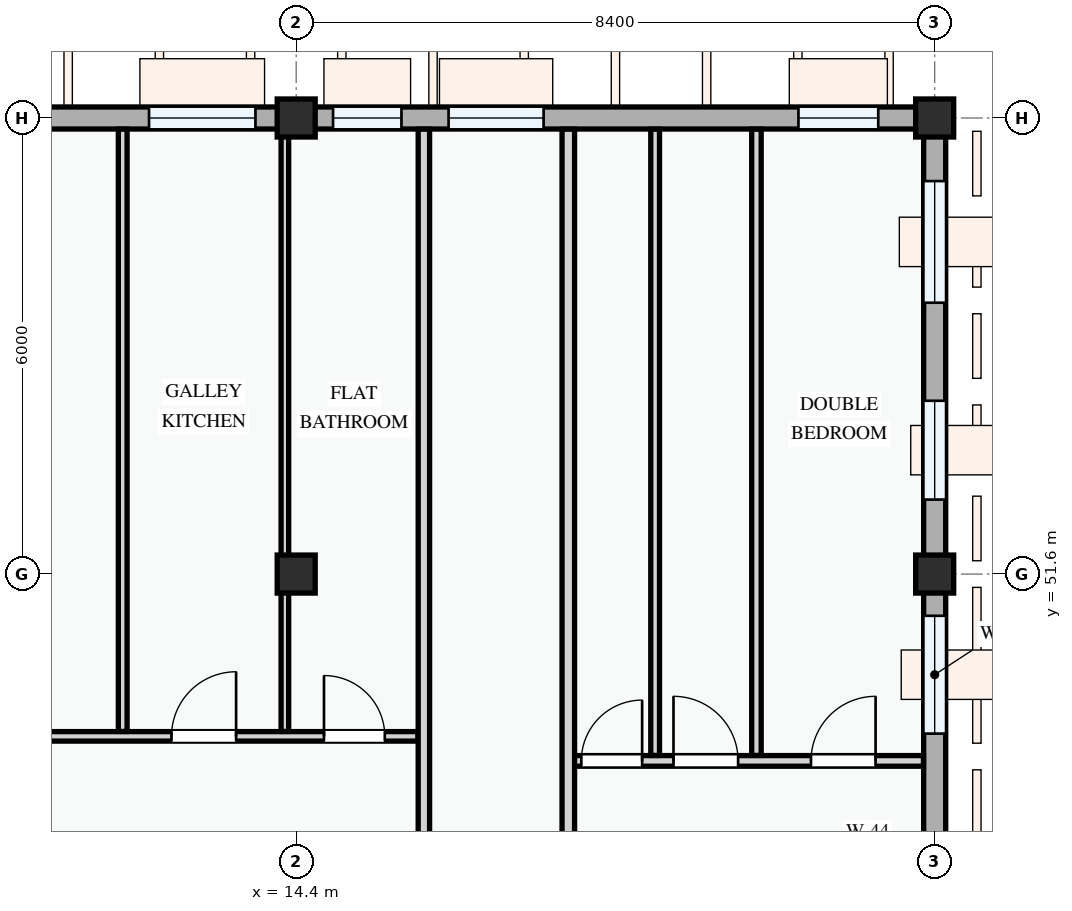
"""IFC4 building model, lengths in metres.
Left out: names, types, materials, properties, quantities, classifications, styles, units other than length and angle.
Written with IfcOpenShell. Run it as: python <this file> out.ifc"""

import sys

from ifc_helpers import new_model, si_unit, direction, frame, frame_2d, origin, origin_2d, place, context, subcontext, project, spatial, rectangle, extrude, element, fill, save


model = new_model("IFC4")
c1 = context("Model", 3, precision=1e-05, world=origin(), true_north=direction((0.0, 1.0)))
c2 = subcontext(c1, "Body", "Model", "MODEL_VIEW")
j1 = project(units=[si_unit("LENGTHUNIT", "METRE"), si_unit("PLANEANGLEUNIT", "RADIAN")], contexts=[c1])
p1 = place(None, origin())
s1 = spatial("IfcSite", under=j1, at=p1, CompositionType="ELEMENT")
p2 = place(p1, origin())
s2 = spatial("IfcBuilding", under=s1, at=p2, CompositionType="ELEMENT")
p3 = place(p2, frame((0.0, 0.0, 21.3)))
s3 = spatial("IfcBuildingStorey", under=s2, at=p3, CompositionType="ELEMENT", Elevation=21.3)
for number, where, z_axis, x_axis in (
    (1, (14.4, 51.6, 0.0), (0.0, 0.0, 1.0), (1.0, 0.0, 0.0)),
    (2, (14.4, 57.6, 0.0), (0.0, 0.0, 1.0), (1.0, 0.0, 0.0)),
    (3, (22.8, 51.6, 0.0), (0.0, 0.0, 1.0), (1.0, 0.0, 0.0)),
    (4, (22.8, 57.6, 0.0), (0.0, 0.0, 1.0), (1.0, 0.0, 0.0)),
):
    element("IfcColumn", number, at=place(p3, frame(where, z_axis=z_axis, x_axis=x_axis)), inside=s3, PredefinedType="COLUMN", context=c2, shape_type="SweptSolid", body=[
        extrude(rectangle(XDim=0.5, YDim=0.5, at=origin_2d()), origin(), (0.0, 0.0, 1.0), 3.3),
    ])
p4 = place(p3, frame((22.8, 43.2, 0.0), z_axis=(0.0, 0.0, 1.0), x_axis=(0.0, 1.0, 0.0)))
e5 = element("IfcWall", 5, at=p4, inside=s3, PredefinedType="STANDARD", context=c2, shape_type="SweptSolid", body=[
    extrude(rectangle(XDim=8.4, YDim=0.29, at=frame_2d((4.2, 0.0))), origin(), (0.0, 0.0, 1.0), 2.425),
])
p5 = place(p4, frame((0.888, 0.0, 0.78)))
e6 = element("IfcOpeningElement", 6, at=p5, cuts=e5, PredefinedType="OPENING", context=c2, shape_type="SweptSolid", body=[
    extrude(rectangle(XDim=1.55, YDim=1.4, at=frame_2d((0.775, 0.7))), frame((0.0, 0.155, 0.0), z_axis=(0.0, -1.0, 0.0), x_axis=(1.0, 0.0, 0.0)), (0.0, 0.0, 1.0), 0.31),
])
p6 = place(p4, frame((3.944, 0.0, 0.78)))
e7 = element("IfcOpeningElement", 7, at=p6, cuts=e5, PredefinedType="OPENING", context=c2, shape_type="SweptSolid", body=[
    extrude(rectangle(XDim=1.05, YDim=1.2, at=frame_2d((0.525, 0.6))), frame((0.0, 0.155, 0.0), z_axis=(0.0, -1.0, 0.0), x_axis=(1.0, 0.0, 0.0)), (0.0, 0.0, 1.0), 0.31),
])
p7 = place(p4, frame((6.301, 0.0, 0.78)))
e8 = element("IfcOpeningElement", 8, at=p7, cuts=e5, PredefinedType="OPENING", context=c2, shape_type="SweptSolid", body=[
    extrude(rectangle(XDim=1.55, YDim=1.4, at=frame_2d((0.775, 0.7))), frame((0.0, 0.155, 0.0), z_axis=(0.0, -1.0, 0.0), x_axis=(1.0, 0.0, 0.0)), (0.0, 0.0, 1.0), 0.31),
])
p8 = place(p3, frame((22.8, 51.6, 0.0), z_axis=(0.0, 0.0, 1.0), x_axis=(0.0, 1.0, 0.0)))
e9 = element("IfcWall", 9, at=p8, inside=s3, PredefinedType="STANDARD", context=c2, shape_type="SweptSolid", body=[
    extrude(rectangle(XDim=6.0, YDim=0.29, at=frame_2d((3.0, 0.0))), origin(), (0.0, 0.0, 1.0), 2.575),
])
p9 = place(p8, frame((0.98, 0.0, 0.78)))
e10 = element("IfcOpeningElement", 10, at=p9, cuts=e9, PredefinedType="OPENING", context=c2, shape_type="SweptSolid", body=[
    extrude(rectangle(XDim=1.3, YDim=1.4, at=frame_2d((0.65, 0.7))), frame((0.0, 0.155, 0.0), z_axis=(0.0, -1.0, 0.0), x_axis=(1.0, 0.0, 0.0)), (0.0, 0.0, 1.0), 0.31),
])
p10 = place(p8, frame((3.57, 0.0, 0.78)))
e11 = element("IfcOpeningElement", 11, at=p10, cuts=e9, PredefinedType="OPENING", context=c2, shape_type="SweptSolid", body=[
    extrude(rectangle(XDim=1.6, YDim=1.55, at=frame_2d((0.8, 0.775))), frame((0.0, 0.155, 0.0), z_axis=(0.0, -1.0, 0.0), x_axis=(1.0, 0.0, 0.0)), (0.0, 0.0, 1.0), 0.31),
])
p11 = place(p3, frame((22.8, 57.6, 0.0), z_axis=(0.0, 0.0, 1.0), x_axis=(-1.0, 0.0, 0.0)))
e12 = element("IfcWall", 12, at=p11, inside=s3, PredefinedType="STANDARD", context=c2, shape_type="SweptSolid", body=[
    extrude(rectangle(XDim=8.4, YDim=0.29, at=frame_2d((4.2, 0.0))), origin(), (0.0, 0.0, 1.0), 2.375),
])
p12 = place(p11, frame((0.742, 0.0, 0.78)))
e13 = element("IfcOpeningElement", 13, at=p12, cuts=e12, PredefinedType="OPENING", context=c2, shape_type="SweptSolid", body=[
    extrude(rectangle(XDim=1.05, YDim=1.2, at=frame_2d((0.525, 0.6))), frame((0.0, 0.155, 0.0), z_axis=(0.0, -1.0, 0.0), x_axis=(1.0, 0.0, 0.0)), (0.0, 0.0, 1.0), 0.31),
])
p13 = place(p11, frame((5.145, 0.0, 0.78)))
e14 = element("IfcOpeningElement", 14, at=p13, cuts=e12, PredefinedType="OPENING", context=c2, shape_type="SweptSolid", body=[
    extrude(rectangle(XDim=1.25, YDim=1.45, at=frame_2d((0.625, 0.725))), frame((0.0, 0.155, 0.0), z_axis=(0.0, -1.0, 0.0), x_axis=(1.0, 0.0, 0.0)), (0.0, 0.0, 1.0), 0.31),
])
p14 = place(p11, frame((7.015, 0.0, 0.78)))
e15 = element("IfcOpeningElement", 15, at=p14, cuts=e12, PredefinedType="OPENING", context=c2, shape_type="SweptSolid", body=[
    extrude(rectangle(XDim=0.9, YDim=1.2, at=frame_2d((0.45, 0.6))), frame((0.0, 0.155, 0.0), z_axis=(0.0, -1.0, 0.0), x_axis=(1.0, 0.0, 0.0)), (0.0, 0.0, 1.0), 0.31),
])
p15 = place(p3, frame((14.4, 57.6, 0.0), z_axis=(0.0, 0.0, 1.0), x_axis=(-1.0, 0.0, 0.0)))
e16 = element("IfcWall", 16, at=p15, inside=s3, PredefinedType="STANDARD", context=c2, shape_type="SweptSolid", body=[
    extrude(rectangle(XDim=6.0, YDim=0.29, at=frame_2d((3.0, 0.0))), origin(), (0.0, 0.0, 1.0), 2.475),
])
p16 = place(p15, frame((0.536, 0.0, 0.78)))
e17 = element("IfcOpeningElement", 17, at=p16, cuts=e16, PredefinedType="OPENING", context=c2, shape_type="SweptSolid", body=[
    extrude(rectangle(XDim=1.4, YDim=1.45, at=frame_2d((0.7, 0.725))), frame((0.0, 0.155, 0.0), z_axis=(0.0, -1.0, 0.0), x_axis=(1.0, 0.0, 0.0)), (0.0, 0.0, 1.0), 0.31),
])
p17 = place(p15, frame((3.596, 0.0, 0.78)))
e18 = element("IfcOpeningElement", 18, at=p17, cuts=e16, PredefinedType="OPENING", context=c2, shape_type="SweptSolid", body=[
    extrude(rectangle(XDim=0.9, YDim=1.2, at=frame_2d((0.45, 0.6))), frame((0.0, 0.155, 0.0), z_axis=(0.0, -1.0, 0.0), x_axis=(1.0, 0.0, 0.0)), (0.0, 0.0, 1.0), 0.31),
])
p18 = place(p3, frame((8.547, 49.465, 0.0), z_axis=(0.0, 0.0, 1.0), x_axis=(1.0, 0.0, 0.0)))
e19 = element("IfcWall", 19, at=p18, inside=s3, PredefinedType="PARTITIONING", context=c2, shape_type="SweptSolid", body=[
    extrude(rectangle(XDim=7.456, YDim=0.125, at=frame_2d((3.728, 0.0))), origin(), (0.0, 0.0, 1.0), 3.0),
])
p19 = place(p18, frame((1.317, 0.0, 0.0)))
e20 = element("IfcOpeningElement", 20, at=p19, cuts=e19, PredefinedType="OPENING", context=c2, shape_type="SweptSolid", body=[
    extrude(rectangle(XDim=0.85, YDim=2.1, at=frame_2d((0.425, 1.05))), frame((0.0, 0.073, 0.0), z_axis=(0.0, -1.0, 0.0), x_axis=(1.0, 0.0, 0.0)), (0.0, 0.0, 1.0), 0.145),
])
p20 = place(p18, frame((4.212, 0.0, 0.0)))
e21 = element("IfcOpeningElement", 21, at=p20, cuts=e19, PredefinedType="OPENING", context=c2, shape_type="SweptSolid", body=[
    extrude(rectangle(XDim=0.85, YDim=2.1, at=frame_2d((0.425, 1.05))), frame((0.0, 0.073, 0.0), z_axis=(0.0, -1.0, 0.0), x_axis=(1.0, 0.0, 0.0)), (0.0, 0.0, 1.0), 0.145),
])
p21 = place(p18, frame((6.219, 0.0, 0.0)))
e22 = element("IfcOpeningElement", 22, at=p21, cuts=e19, PredefinedType="OPENING", context=c2, shape_type="SweptSolid", body=[
    extrude(rectangle(XDim=0.8, YDim=2.1, at=frame_2d((0.4, 1.05))), frame((0.0, 0.073, 0.0), z_axis=(0.0, -1.0, 0.0), x_axis=(1.0, 0.0, 0.0)), (0.0, 0.0, 1.0), 0.145),
])
p22 = place(p3, frame((12.118, 49.53, 0.0), z_axis=(0.0, 0.0, 1.0), x_axis=(0.0, 1.0, 0.0)))
e23 = element("IfcWall", 23, at=p22, inside=s3, PredefinedType="PARTITIONING", context=c2, shape_type="SweptSolid", body=[
    extrude(rectangle(XDim=7.923, YDim=0.115, at=frame_2d((3.962, 0.0))), origin(), (0.0, 0.0, 1.0), 3.0),
])
p23 = place(p3, frame((14.251, 49.53, 0.0), z_axis=(0.0, 0.0, 1.0), x_axis=(0.0, 1.0, 0.0)))
e24 = element("IfcWall", 24, at=p23, inside=s3, PredefinedType="PARTITIONING", context=c2, shape_type="SweptSolid", body=[
    extrude(rectangle(XDim=7.923, YDim=0.1, at=frame_2d((3.962, 0.0))), origin(), (0.0, 0.0, 1.0), 2.425),
])
p24 = place(p3, frame((17.98, 49.142, 0.0), z_axis=(0.0, 0.0, 1.0), x_axis=(1.0, 0.0, 0.0)))
e25 = element("IfcWall", 25, at=p24, inside=s3, PredefinedType="PARTITIONING", context=c2, shape_type="SweptSolid", body=[
    extrude(rectangle(XDim=4.673, YDim=0.14, at=frame_2d((2.336, 0.0))), origin(), (0.0, 0.0, 1.0), 3.0),
])
p25 = place(p24, frame((0.171, 0.0, 0.0)))
e26 = element("IfcOpeningElement", 26, at=p25, cuts=e25, PredefinedType="OPENING", context=c2, shape_type="SweptSolid", body=[
    extrude(rectangle(XDim=0.8, YDim=2.1, at=frame_2d((0.4, 1.05))), frame((0.0, 0.08, 0.0), z_axis=(0.0, -1.0, 0.0), x_axis=(1.0, 0.0, 0.0)), (0.0, 0.0, 1.0), 0.16),
])
p26 = place(p24, frame((1.384, 0.0, 0.0)))
e27 = element("IfcOpeningElement", 27, at=p26, cuts=e25, PredefinedType="OPENING", context=c2, shape_type="SweptSolid", body=[
    extrude(rectangle(XDim=0.85, YDim=2.1, at=frame_2d((0.425, 1.05))), frame((0.0, 0.08, 0.0), z_axis=(0.0, -1.0, 0.0), x_axis=(1.0, 0.0, 0.0)), (0.0, 0.0, 1.0), 0.16),
])
p27 = place(p24, frame((3.193, 0.0, 0.0)))
e28 = element("IfcOpeningElement", 28, at=p27, cuts=e25, PredefinedType="OPENING", context=c2, shape_type="SweptSolid", body=[
    extrude(rectangle(XDim=0.85, YDim=2.1, at=frame_2d((0.425, 1.05))), frame((0.0, 0.08, 0.0), z_axis=(0.0, -1.0, 0.0), x_axis=(1.0, 0.0, 0.0)), (0.0, 0.0, 1.0), 0.16),
])
p28 = place(p3, frame((20.455, 49.214, 0.0), z_axis=(0.0, 0.0, 1.0), x_axis=(0.0, 1.0, 0.0)))
e29 = element("IfcWall", 29, at=p28, inside=s3, PredefinedType="PARTITIONING", context=c2, shape_type="SweptSolid", body=[
    extrude(rectangle(XDim=8.239, YDim=0.125, at=frame_2d((4.119, 0.0))), origin(), (0.0, 0.0, 1.0), 3.0),
])
p29 = place(p3, frame((19.122, 49.214, 0.0), z_axis=(0.0, 0.0, 1.0), x_axis=(0.0, 1.0, 0.0)))
e30 = element("IfcWall", 30, at=p29, inside=s3, PredefinedType="PARTITIONING", context=c2, shape_type="SweptSolid", body=[
    extrude(rectangle(XDim=8.239, YDim=0.115, at=frame_2d((4.119, 0.0))), origin(), (0.0, 0.0, 1.0), 3.0),
])
p30 = place(p3, frame((16.08, 22.66, 0.0), z_axis=(0.0, 0.0, 1.0), x_axis=(0.0, 1.0, 0.0)))
e31 = element("IfcWall", 31, at=p30, inside=s3, PredefinedType="PARTITIONING", context=c2, shape_type="SweptSolid", body=[
    extrude(rectangle(XDim=34.793, YDim=0.15, at=frame_2d((17.396, 0.0))), origin(), (0.0, 0.0, 1.0), 3.0),
])
p31 = place(p30, frame((2.627, 0.0, 0.0)))
e32 = element("IfcOpeningElement", 32, at=p31, cuts=e31, PredefinedType="OPENING", context=c2, shape_type="SweptSolid", body=[
    extrude(rectangle(XDim=0.92, YDim=2.1, at=frame_2d((0.46, 1.05))), frame((0.0, 0.085, 0.0), z_axis=(0.0, -1.0, 0.0), x_axis=(1.0, 0.0, 0.0)), (0.0, 0.0, 1.0), 0.17),
])
p32 = place(p30, frame((10.02, 0.0, 0.0)))
e33 = element("IfcOpeningElement", 33, at=p32, cuts=e31, PredefinedType="OPENING", context=c2, shape_type="SweptSolid", body=[
    extrude(rectangle(XDim=0.92, YDim=2.1, at=frame_2d((0.46, 1.05))), frame((0.0, 0.085, 0.0), z_axis=(0.0, -1.0, 0.0), x_axis=(1.0, 0.0, 0.0)), (0.0, 0.0, 1.0), 0.17),
])
p33 = place(p30, frame((24.355, 0.0, 0.0)))
e34 = element("IfcOpeningElement", 34, at=p33, cuts=e31, PredefinedType="OPENING", context=c2, shape_type="SweptSolid", body=[
    extrude(rectangle(XDim=0.92, YDim=2.1, at=frame_2d((0.46, 1.05))), frame((0.0, 0.085, 0.0), z_axis=(0.0, -1.0, 0.0), x_axis=(1.0, 0.0, 0.0)), (0.0, 0.0, 1.0), 0.17),
])
p34 = place(p3, frame((17.98, 22.66, 0.0), z_axis=(0.0, 0.0, 1.0), x_axis=(0.0, 1.0, 0.0)))
e35 = element("IfcWall", 35, at=p34, inside=s3, PredefinedType="PARTITIONING", context=c2, shape_type="SweptSolid", body=[
    extrude(rectangle(XDim=34.793, YDim=0.165, at=frame_2d((17.396, 0.0))), origin(), (0.0, 0.0, 1.0), 3.0),
])
p35 = place(p34, frame((2.63, 0.0, 0.0)))
e36 = element("IfcOpeningElement", 36, at=p35, cuts=e35, PredefinedType="OPENING", context=c2, shape_type="SweptSolid", body=[
    extrude(rectangle(XDim=0.96, YDim=2.12, at=frame_2d((0.48, 1.06))), frame((0.0, 0.093, 0.0), z_axis=(0.0, -1.0, 0.0), x_axis=(1.0, 0.0, 0.0)), (0.0, 0.0, 1.0), 0.185),
])
p36 = place(p34, frame((10.02, 0.0, 0.0)))
e37 = element("IfcOpeningElement", 37, at=p36, cuts=e35, PredefinedType="OPENING", context=c2, shape_type="SweptSolid", body=[
    extrude(rectangle(XDim=0.92, YDim=2.1, at=frame_2d((0.46, 1.05))), frame((0.0, 0.093, 0.0), z_axis=(0.0, -1.0, 0.0), x_axis=(1.0, 0.0, 0.0)), (0.0, 0.0, 1.0), 0.185),
])
p37 = place(p34, frame((24.289, 0.0, 0.0)))
e38 = element("IfcOpeningElement", 38, at=p37, cuts=e35, PredefinedType="OPENING", context=c2, shape_type="SweptSolid", body=[
    extrude(rectangle(XDim=0.92, YDim=2.1, at=frame_2d((0.46, 1.05))), frame((0.0, 0.093, 0.0), z_axis=(0.0, -1.0, 0.0), x_axis=(1.0, 0.0, 0.0)), (0.0, 0.0, 1.0), 0.185),
])
p38 = place(p7, origin())
e39 = element("IfcWindow", 39, at=p38, inside=s3, PartitioningType="SINGLE_PANEL", PredefinedType="WINDOW", context=c2, shape_type="SweptSolid", body=[
    extrude(rectangle(XDim=1.55, YDim=1.4, at=frame_2d((0.775, 0.7))), frame((0.0, 0.03, 0.0), z_axis=(0.0, -1.0, 0.0), x_axis=(1.0, 0.0, 0.0)), (0.0, 0.0, 1.0), 0.06),
])
fill(e8, e39)
p39 = place(p9, origin())
e40 = element("IfcWindow", 40, at=p39, inside=s3, PartitioningType="SINGLE_PANEL", PredefinedType="WINDOW", context=c2, shape_type="SweptSolid", body=[
    extrude(rectangle(XDim=1.3, YDim=1.4, at=frame_2d((0.65, 0.7))), frame((0.0, 0.03, 0.0), z_axis=(0.0, -1.0, 0.0), x_axis=(1.0, 0.0, 0.0)), (0.0, 0.0, 1.0), 0.06),
])
fill(e10, e40)
p40 = place(p10, origin())
e41 = element("IfcWindow", 41, at=p40, inside=s3, PartitioningType="DOUBLE_PANEL_VERTICAL", PredefinedType="WINDOW", context=c2, shape_type="SweptSolid", body=[
    extrude(rectangle(XDim=1.6, YDim=1.55, at=frame_2d((0.8, 0.775))), frame((0.0, 0.03, 0.0), z_axis=(0.0, -1.0, 0.0), x_axis=(1.0, 0.0, 0.0)), (0.0, 0.0, 1.0), 0.06),
])
fill(e11, e41)
p41 = place(p12, origin())
e42 = element("IfcWindow", 42, at=p41, inside=s3, PartitioningType="SINGLE_PANEL", PredefinedType="WINDOW", context=c2, shape_type="SweptSolid", body=[
    extrude(rectangle(XDim=1.05, YDim=1.2, at=frame_2d((0.525, 0.6))), frame((0.0, 0.03, 0.0), z_axis=(0.0, -1.0, 0.0), x_axis=(1.0, 0.0, 0.0)), (0.0, 0.0, 1.0), 0.06),
])
fill(e13, e42)
p42 = place(p13, origin())
e43 = element("IfcWindow", 43, at=p42, inside=s3, PartitioningType="SINGLE_PANEL", PredefinedType="WINDOW", context=c2, shape_type="SweptSolid", body=[
    extrude(rectangle(XDim=1.25, YDim=1.45, at=frame_2d((0.625, 0.725))), frame((0.0, 0.03, 0.0), z_axis=(0.0, -1.0, 0.0), x_axis=(1.0, 0.0, 0.0)), (0.0, 0.0, 1.0), 0.06),
])
fill(e14, e43)
p43 = place(p14, origin())
e44 = element("IfcWindow", 44, at=p43, inside=s3, PartitioningType="SINGLE_PANEL", PredefinedType="WINDOW", context=c2, shape_type="SweptSolid", body=[
    extrude(rectangle(XDim=0.9, YDim=1.2, at=frame_2d((0.45, 0.6))), frame((0.0, 0.03, 0.0), z_axis=(0.0, -1.0, 0.0), x_axis=(1.0, 0.0, 0.0)), (0.0, 0.0, 1.0), 0.06),
])
fill(e15, e44)
p44 = place(p16, origin())
e45 = element("IfcWindow", 45, at=p44, inside=s3, PartitioningType="SINGLE_PANEL", PredefinedType="WINDOW", context=c2, shape_type="SweptSolid", body=[
    extrude(rectangle(XDim=1.4, YDim=1.45, at=frame_2d((0.7, 0.725))), frame((0.0, 0.03, 0.0), z_axis=(0.0, -1.0, 0.0), x_axis=(1.0, 0.0, 0.0)), (0.0, 0.0, 1.0), 0.06),
])
fill(e17, e45)
p45 = place(p20, origin())
e46 = element("IfcDoor", 46, at=p45, inside=s3, OperationType="SINGLE_SWING_RIGHT", PredefinedType="DOOR", context=c2, shape_type="SweptSolid", body=[
    extrude(rectangle(XDim=0.85, YDim=2.1, at=frame_2d((0.425, 1.05))), frame((0.0, 0.025, 0.0), z_axis=(0.0, -1.0, 0.0), x_axis=(1.0, 0.0, 0.0)), (0.0, 0.0, 1.0), 0.05),
])
fill(e21, e46)
p46 = place(p21, origin())
e47 = element("IfcDoor", 47, at=p46, inside=s3, OperationType="SINGLE_SWING_LEFT", PredefinedType="DOOR", context=c2, shape_type="SweptSolid", body=[
    extrude(rectangle(XDim=0.8, YDim=2.1, at=frame_2d((0.4, 1.05))), frame((0.0, 0.025, 0.0), z_axis=(0.0, -1.0, 0.0), x_axis=(1.0, 0.0, 0.0)), (0.0, 0.0, 1.0), 0.05),
])
fill(e22, e47)
p47 = place(p25, origin())
e48 = element("IfcDoor", 48, at=p47, inside=s3, OperationType="SINGLE_SWING_RIGHT", PredefinedType="DOOR", context=c2, shape_type="SweptSolid", body=[
    extrude(rectangle(XDim=0.8, YDim=2.1, at=frame_2d((0.4, 1.05))), frame((0.0, 0.025, 0.0), z_axis=(0.0, -1.0, 0.0), x_axis=(1.0, 0.0, 0.0)), (0.0, 0.0, 1.0), 0.05),
])
fill(e26, e48)
p48 = place(p26, origin())
e49 = element("IfcDoor", 49, at=p48, inside=s3, OperationType="SINGLE_SWING_LEFT", PredefinedType="DOOR", context=c2, shape_type="SweptSolid", body=[
    extrude(rectangle(XDim=0.85, YDim=2.1, at=frame_2d((0.425, 1.05))), frame((0.0, 0.025, 0.0), z_axis=(0.0, -1.0, 0.0), x_axis=(1.0, 0.0, 0.0)), (0.0, 0.0, 1.0), 0.05),
])
fill(e27, e49)
p49 = place(p27, origin())
e50 = element("IfcDoor", 50, at=p49, inside=s3, OperationType="SINGLE_SWING_RIGHT", PredefinedType="DOOR", context=c2, shape_type="SweptSolid", body=[
    extrude(rectangle(XDim=0.85, YDim=2.1, at=frame_2d((0.425, 1.05))), frame((0.0, 0.025, 0.0), z_axis=(0.0, -1.0, 0.0), x_axis=(1.0, 0.0, 0.0)), (0.0, 0.0, 1.0), 0.05),
])
fill(e28, e50)
save(model, sys.argv[1])
